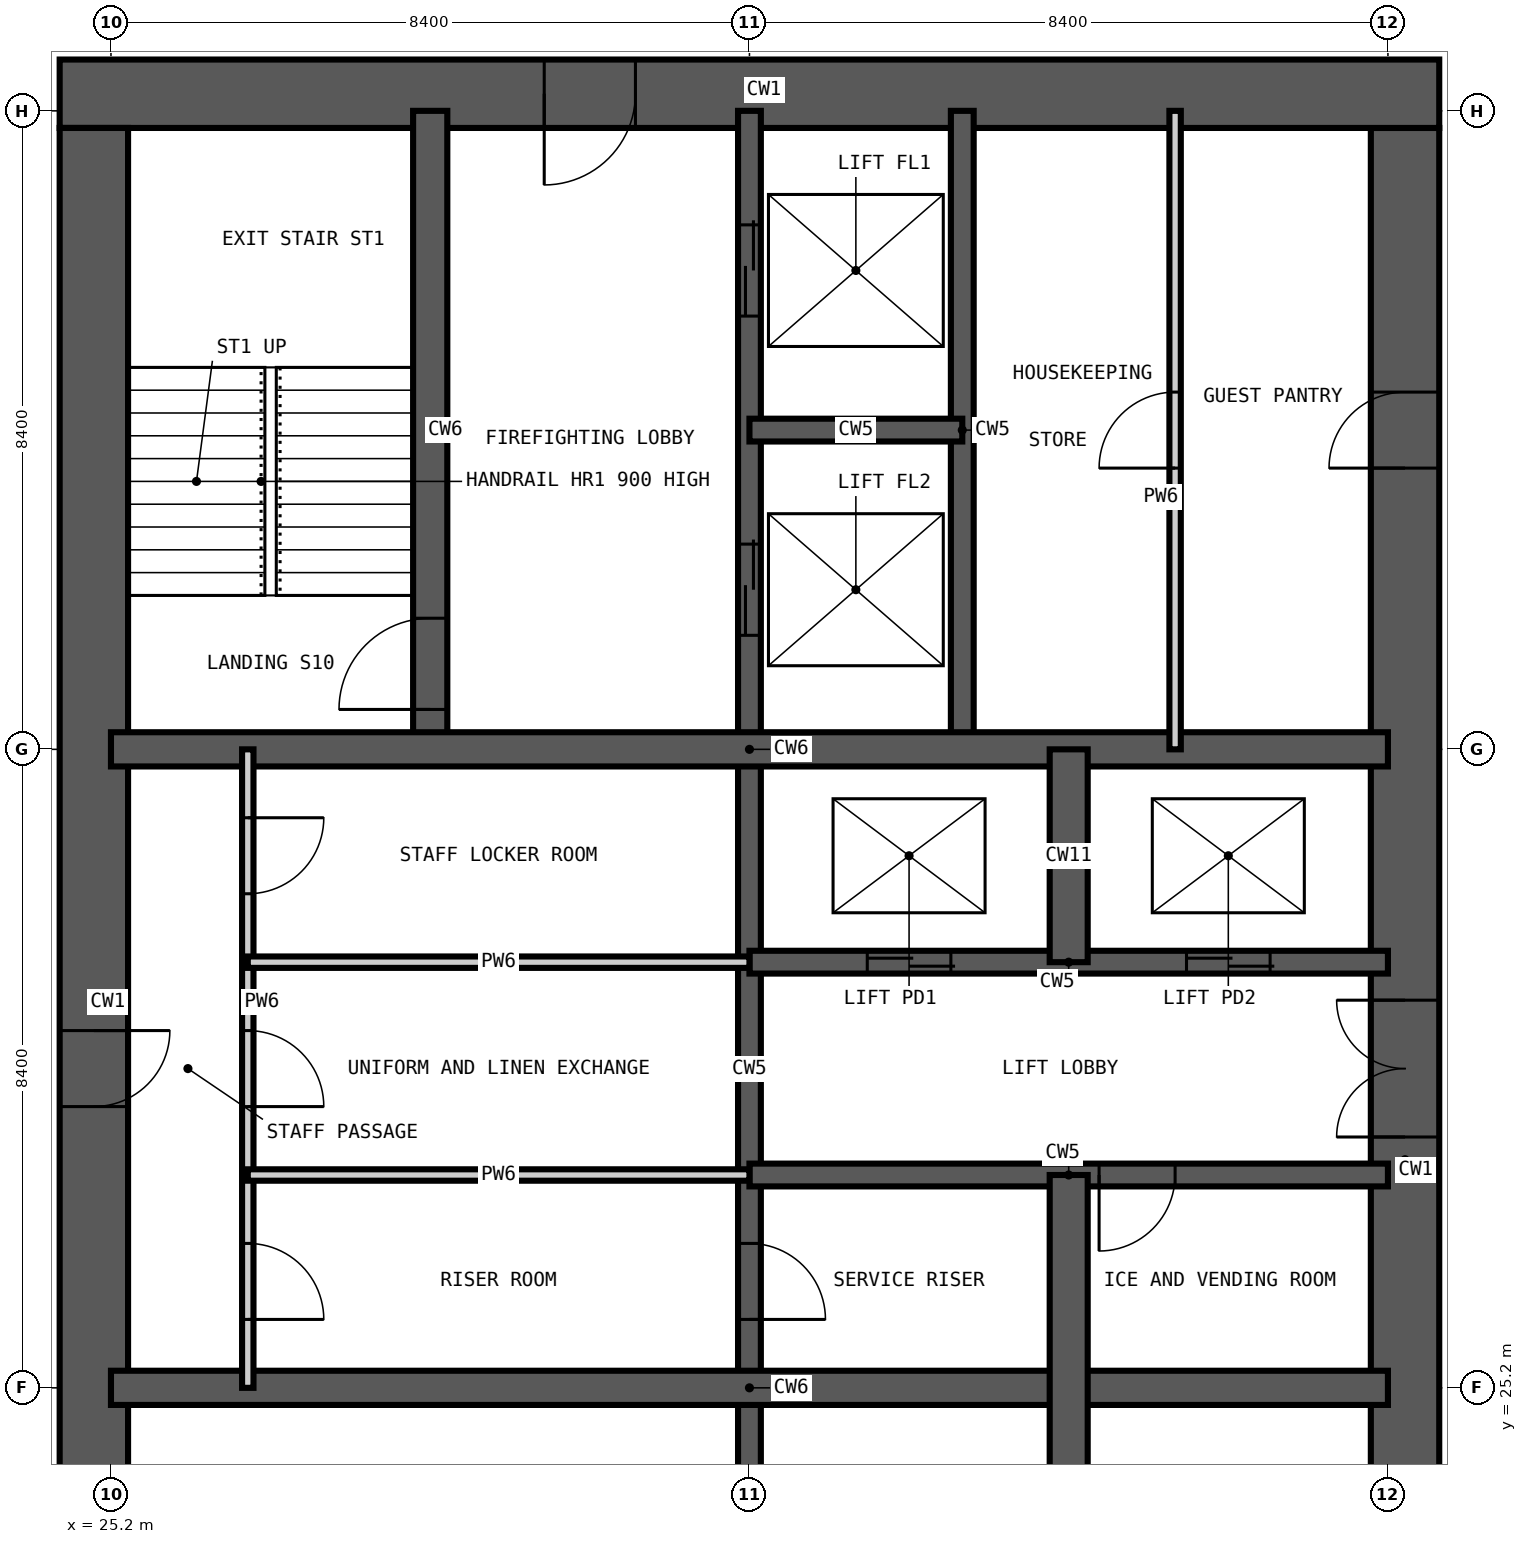
"""IFC4 building model, lengths in metres.
Left out: names, types, materials, properties, quantities, classifications, styles, units other than length and angle.
Written with IfcOpenShell. Run it as: python <this file> out.ifc"""

import sys

from ifc_helpers import new_model, si_unit, direction, frame, frame_2d, origin, place, context, subcontext, project, spatial, rectangle, extrude, element, fill, save


model = new_model("IFC4")
c1 = context("Model", 3, precision=1e-05, world=origin(), true_north=direction((0.0, 1.0)))
c2 = subcontext(c1, "Body", "Model", "MODEL_VIEW")
j1 = project(units=[si_unit("LENGTHUNIT", "METRE"), si_unit("PLANEANGLEUNIT", "RADIAN")], contexts=[c1])
p1 = place(None, origin())
s1 = spatial("IfcSite", under=j1, at=p1, CompositionType="ELEMENT")
p2 = place(p1, origin())
s2 = spatial("IfcBuilding", under=s1, at=p2, CompositionType="ELEMENT")
p3 = place(p2, frame((0.0, 0.0, 237.3)))
s3 = spatial("IfcBuildingStorey", under=s2, at=p3, CompositionType="ELEMENT", Elevation=237.3)
p4 = place(p3, frame((42.225, 17.025, -0.35), z_axis=(0.0, 0.0, 1.0), x_axis=(0.0, 1.0, 0.0)))
e1 = element("IfcWall", 1, at=p4, inside=s3, PredefinedType="SHEAR", context=c2, shape_type="SweptSolid", body=[
    extrude(rectangle(XDim=24.75, YDim=0.9, at=frame_2d((12.375, 0.0))), origin(), (0.0, 0.0, 1.0), 3.9),
])
p5 = place(p4, frame((0.575, 0.0, 0.35)))
e2 = element("IfcOpeningElement", 2, at=p5, cuts=e1, PredefinedType="OPENING", context=c2, shape_type="SweptSolid", body=[
    extrude(rectangle(XDim=1.2, YDim=2.2, at=frame_2d((0.6, 1.1))), frame((0.0, 0.46, 0.0), z_axis=(0.0, -1.0, 0.0), x_axis=(1.0, 0.0, 0.0)), (0.0, 0.0, 1.0), 0.92),
])
p6 = place(p4, frame((11.475, 0.0, 0.35)))
e3 = element("IfcOpeningElement", 3, at=p6, cuts=e1, PredefinedType="OPENING", context=c2, shape_type="SweptSolid", body=[
    extrude(rectangle(XDim=1.8, YDim=2.2, at=frame_2d((0.9, 1.1))), frame((0.0, 0.46, 0.0), z_axis=(0.0, -1.0, 0.0), x_axis=(1.0, 0.0, 0.0)), (0.0, 0.0, 1.0), 0.92),
])
p7 = place(p4, frame((20.275, 0.0, 0.35)))
e4 = element("IfcOpeningElement", 4, at=p7, cuts=e1, PredefinedType="OPENING", context=c2, shape_type="SweptSolid", body=[
    extrude(rectangle(XDim=1.0, YDim=2.1, at=frame_2d((0.5, 1.05))), frame((0.0, 0.46, 0.0), z_axis=(0.0, -1.0, 0.0), x_axis=(1.0, 0.0, 0.0)), (0.0, 0.0, 1.0), 0.92),
])
p8 = place(p3, frame((42.675, 42.225, -0.35), z_axis=(0.0, 0.0, 1.0), x_axis=(-1.0, 0.0, 0.0)))
e5 = element("IfcWall", 5, at=p8, inside=s3, PredefinedType="SHEAR", context=c2, shape_type="SweptSolid", body=[
    extrude(rectangle(XDim=18.15, YDim=0.9, at=frame_2d((9.075, 0.0))), origin(), (0.0, 0.0, 1.0), 3.9),
])
p9 = place(p8, frame((10.575, 0.0, 0.35)))
e6 = element("IfcOpeningElement", 6, at=p9, cuts=e5, PredefinedType="OPENING", context=c2, shape_type="SweptSolid", body=[
    extrude(rectangle(XDim=1.2, YDim=2.2, at=frame_2d((0.6, 1.1))), frame((0.0, 0.46, 0.0), z_axis=(0.0, -1.0, 0.0), x_axis=(1.0, 0.0, 0.0)), (0.0, 0.0, 1.0), 0.92),
])
p10 = place(p3, frame((24.975, 41.775, -0.35), z_axis=(0.0, 0.0, 1.0), x_axis=(0.0, -1.0, 0.0)))
e7 = element("IfcWall", 7, at=p10, inside=s3, PredefinedType="SHEAR", context=c2, shape_type="SweptSolid", body=[
    extrude(rectangle(XDim=24.75, YDim=0.9, at=frame_2d((12.375, 0.0))), origin(), (0.0, 0.0, 1.0), 3.9),
])
p11 = place(p10, frame((11.875, 0.0, 0.35)))
e8 = element("IfcOpeningElement", 8, at=p11, cuts=e7, PredefinedType="OPENING", context=c2, shape_type="SweptSolid", body=[
    extrude(rectangle(XDim=1.0, YDim=2.1, at=frame_2d((0.5, 1.05))), frame((0.0, 0.46, 0.0), z_axis=(0.0, -1.0, 0.0), x_axis=(1.0, 0.0, 0.0)), (0.0, 0.0, 1.0), 0.92),
])
p12 = place(p3, frame((33.6, 16.8, -0.35), z_axis=(0.0, 0.0, 1.0), x_axis=(0.0, 1.0, 0.0)))
e9 = element("IfcWall", 9, at=p12, inside=s3, PredefinedType="SHEAR", context=c2, shape_type="SweptSolid", body=[
    extrude(rectangle(XDim=25.2, YDim=0.3, at=frame_2d((12.6, 0.0))), origin(), (0.0, 0.0, 1.0), 3.9),
])
p13 = place(p12, frame((22.5, 0.0, 0.35)))
e10 = element("IfcOpeningElement", 10, at=p13, cuts=e9, PredefinedType="OPENING", context=c2, shape_type="SweptSolid", body=[
    extrude(rectangle(XDim=1.2, YDim=2.2, at=frame_2d((0.6, 1.1))), frame((0.0, 0.16, 0.0), z_axis=(0.0, -1.0, 0.0), x_axis=(1.0, 0.0, 0.0)), (0.0, 0.0, 1.0), 0.32),
])
p14 = place(p12, frame((18.3, 0.0, 0.35)))
e11 = element("IfcOpeningElement", 11, at=p14, cuts=e9, PredefinedType="OPENING", context=c2, shape_type="SweptSolid", body=[
    extrude(rectangle(XDim=1.2, YDim=2.2, at=frame_2d((0.6, 1.1))), frame((0.0, 0.16, 0.0), z_axis=(0.0, -1.0, 0.0), x_axis=(1.0, 0.0, 0.0)), (0.0, 0.0, 1.0), 0.32),
])
p15 = place(p12, frame((9.3, 0.0, 0.35)))
e12 = element("IfcOpeningElement", 12, at=p15, cuts=e9, PredefinedType="OPENING", context=c2, shape_type="SweptSolid", body=[
    extrude(rectangle(XDim=1.0, YDim=2.1, at=frame_2d((0.5, 1.05))), frame((0.0, 0.16, 0.0), z_axis=(0.0, -1.0, 0.0), x_axis=(1.0, 0.0, 0.0)), (0.0, 0.0, 1.0), 0.32),
])
p16 = place(p3, frame((36.4, 33.6, -0.35), z_axis=(0.0, 0.0, 1.0), x_axis=(0.0, 1.0, 0.0)))
e13 = element("IfcWall", 13, at=p16, inside=s3, PredefinedType="SHEAR", context=c2, shape_type="SweptSolid", body=[
    extrude(rectangle(XDim=8.4, YDim=0.3, at=frame_2d((4.2, 0.0))), origin(), (0.0, 0.0, 1.0), 3.9),
])
p17 = place(p3, frame((33.6, 28.0, -0.35), z_axis=(0.0, 0.0, 1.0), x_axis=(1.0, 0.0, 0.0)))
e14 = element("IfcWall", 14, at=p17, inside=s3, PredefinedType="SHEAR", context=c2, shape_type="SweptSolid", body=[
    extrude(rectangle(XDim=8.4, YDim=0.3, at=frame_2d((4.2, 0.0))), origin(), (0.0, 0.0, 1.0), 3.9),
])
p18 = place(p17, frame((4.6, 0.0, 0.35)))
e15 = element("IfcOpeningElement", 15, at=p18, cuts=e14, PredefinedType="OPENING", context=c2, shape_type="SweptSolid", body=[
    extrude(rectangle(XDim=1.0, YDim=2.1, at=frame_2d((0.5, 1.05))), frame((0.0, 0.16, 0.0), z_axis=(0.0, -1.0, 0.0), x_axis=(1.0, 0.0, 0.0)), (0.0, 0.0, 1.0), 0.32),
])
p19 = place(p3, frame((33.6, 30.8, -0.35), z_axis=(0.0, 0.0, 1.0), x_axis=(1.0, 0.0, 0.0)))
e16 = element("IfcWall", 16, at=p19, inside=s3, PredefinedType="SHEAR", context=c2, shape_type="SweptSolid", body=[
    extrude(rectangle(XDim=8.4, YDim=0.3, at=frame_2d((4.2, 0.0))), origin(), (0.0, 0.0, 1.0), 3.9),
])
p20 = place(p19, frame((1.55, 0.0, 0.35)))
e17 = element("IfcOpeningElement", 17, at=p20, cuts=e16, PredefinedType="OPENING", context=c2, shape_type="SweptSolid", body=[
    extrude(rectangle(XDim=1.1, YDim=2.2, at=frame_2d((0.55, 1.1))), frame((0.0, 0.16, 0.0), z_axis=(0.0, -1.0, 0.0), x_axis=(1.0, 0.0, 0.0)), (0.0, 0.0, 1.0), 0.32),
])
p21 = place(p19, frame((5.75, 0.0, 0.35)))
e18 = element("IfcOpeningElement", 18, at=p21, cuts=e16, PredefinedType="OPENING", context=c2, shape_type="SweptSolid", body=[
    extrude(rectangle(XDim=1.1, YDim=2.2, at=frame_2d((0.55, 1.1))), frame((0.0, 0.16, 0.0), z_axis=(0.0, -1.0, 0.0), x_axis=(1.0, 0.0, 0.0)), (0.0, 0.0, 1.0), 0.32),
])
p22 = place(p3, frame((33.6, 37.8, -0.35), z_axis=(0.0, 0.0, 1.0), x_axis=(1.0, 0.0, 0.0)))
e19 = element("IfcWall", 19, at=p22, inside=s3, PredefinedType="SHEAR", context=c2, shape_type="SweptSolid", body=[
    extrude(rectangle(XDim=2.8, YDim=0.3, at=frame_2d((1.4, 0.0))), origin(), (0.0, 0.0, 1.0), 3.9),
])
p23 = place(p3, frame((29.4, 33.6, -0.35), z_axis=(0.0, 0.0, 1.0), x_axis=(0.0, 1.0, 0.0)))
e20 = element("IfcWall", 20, at=p23, inside=s3, PredefinedType="SHEAR", context=c2, shape_type="SweptSolid", body=[
    extrude(rectangle(XDim=8.4, YDim=0.45, at=frame_2d((4.2, 0.0))), origin(), (0.0, 0.0, 1.0), 3.9),
])
p24 = place(p23, frame((0.525, 0.0, 0.35)))
e21 = element("IfcOpeningElement", 21, at=p24, cuts=e20, PredefinedType="OPENING", context=c2, shape_type="SweptSolid", body=[
    extrude(rectangle(XDim=1.2, YDim=2.2, at=frame_2d((0.6, 1.1))), frame((0.0, 0.235, 0.0), z_axis=(0.0, -1.0, 0.0), x_axis=(1.0, 0.0, 0.0)), (0.0, 0.0, 1.0), 0.47),
])
for number, where, z_axis, x_axis in (
    (22, (25.2, 25.2, -0.35), (0.0, 0.0, 1.0), (1.0, 0.0, 0.0)),
    (23, (25.2, 33.6, -0.35), (0.0, 0.0, 1.0), (1.0, 0.0, 0.0)),
):
    element("IfcWall", number, at=place(p3, frame(where, z_axis=z_axis, x_axis=x_axis)), inside=s3, PredefinedType="SHEAR", context=c2, shape_type="SweptSolid", body=[
        extrude(rectangle(XDim=16.8, YDim=0.45, at=frame_2d((8.4, 0.0))), origin(), (0.0, 0.0, 1.0), 3.9),
    ])
p25 = place(p3, frame((37.8, 16.8, -0.35), z_axis=(0.0, 0.0, 1.0), x_axis=(0.0, 1.0, 0.0)))
e24 = element("IfcWall", 24, at=p25, inside=s3, PredefinedType="SHEAR", context=c2, shape_type="SweptSolid", body=[
    extrude(rectangle(XDim=11.2, YDim=0.5, at=frame_2d((5.6, 0.0))), origin(), (0.0, 0.0, 1.0), 3.9),
])
p26 = place(p3, frame((37.8, 30.8, -0.35), z_axis=(0.0, 0.0, 1.0), x_axis=(0.0, 1.0, 0.0)))
e25 = element("IfcWall", 25, at=p26, inside=s3, PredefinedType="SHEAR", context=c2, shape_type="SweptSolid", body=[
    extrude(rectangle(XDim=2.8, YDim=0.5, at=frame_2d((1.4, 0.0))), origin(), (0.0, 0.0, 1.0), 3.9),
])
p27 = place(p3, frame((27.0, 25.2, 0.0), z_axis=(0.0, 0.0, 1.0), x_axis=(0.0, 1.0, 0.0)))
e26 = element("IfcWall", 26, at=p27, inside=s3, PredefinedType="PARTITIONING", context=c2, shape_type="SweptSolid", body=[
    extrude(rectangle(XDim=8.4, YDim=0.15, at=frame_2d((4.2, 0.0))), origin(), (0.0, 0.0, 1.0), 3.55),
])
p28 = place(p27, frame((0.9, 0.0, 0.0)))
e27 = element("IfcOpeningElement", 27, at=p28, cuts=e26, PredefinedType="OPENING", context=c2, shape_type="SweptSolid", body=[
    extrude(rectangle(XDim=1.0, YDim=2.1, at=frame_2d((0.5, 1.05))), frame((0.0, 0.085, 0.0), z_axis=(0.0, -1.0, 0.0), x_axis=(1.0, 0.0, 0.0)), (0.0, 0.0, 1.0), 0.17),
])
p29 = place(p27, frame((3.7, 0.0, 0.0)))
e28 = element("IfcOpeningElement", 28, at=p29, cuts=e26, PredefinedType="OPENING", context=c2, shape_type="SweptSolid", body=[
    extrude(rectangle(XDim=1.0, YDim=2.1, at=frame_2d((0.5, 1.05))), frame((0.0, 0.085, 0.0), z_axis=(0.0, -1.0, 0.0), x_axis=(1.0, 0.0, 0.0)), (0.0, 0.0, 1.0), 0.17),
])
p30 = place(p27, frame((6.5, 0.0, 0.0)))
e29 = element("IfcOpeningElement", 29, at=p30, cuts=e26, PredefinedType="OPENING", context=c2, shape_type="SweptSolid", body=[
    extrude(rectangle(XDim=1.0, YDim=2.1, at=frame_2d((0.5, 1.05))), frame((0.0, 0.085, 0.0), z_axis=(0.0, -1.0, 0.0), x_axis=(1.0, 0.0, 0.0)), (0.0, 0.0, 1.0), 0.17),
])
p31 = place(p3, frame((39.2, 33.6, 0.0), z_axis=(0.0, 0.0, 1.0), x_axis=(0.0, 1.0, 0.0)))
e30 = element("IfcWall", 30, at=p31, inside=s3, PredefinedType="PARTITIONING", context=c2, shape_type="SweptSolid", body=[
    extrude(rectangle(XDim=8.4, YDim=0.15, at=frame_2d((4.2, 0.0))), origin(), (0.0, 0.0, 1.0), 3.55),
])
p32 = place(p31, frame((3.7, 0.0, 0.0)))
e31 = element("IfcOpeningElement", 31, at=p32, cuts=e30, PredefinedType="OPENING", context=c2, shape_type="SweptSolid", body=[
    extrude(rectangle(XDim=1.0, YDim=2.1, at=frame_2d((0.5, 1.05))), frame((0.0, 0.085, 0.0), z_axis=(0.0, -1.0, 0.0), x_axis=(1.0, 0.0, 0.0)), (0.0, 0.0, 1.0), 0.17),
])
for number, where, z_axis, x_axis in (
    (32, (27.0, 28.0, 0.0), (0.0, 0.0, 1.0), (1.0, 0.0, 0.0)),
    (33, (27.0, 30.8, 0.0), (0.0, 0.0, 1.0), (1.0, 0.0, 0.0)),
):
    element("IfcWall", number, at=place(p3, frame(where, z_axis=z_axis, x_axis=x_axis)), inside=s3, PredefinedType="PARTITIONING", context=c2, shape_type="SweptSolid", body=[
        extrude(rectangle(XDim=6.6, YDim=0.15, at=frame_2d((3.3, 0.0))), origin(), (0.0, 0.0, 1.0), 3.55),
    ])
p33 = place(p24, origin())
e34 = element("IfcDoor", 34, at=p33, inside=s3, OperationType="SINGLE_SWING_LEFT", PredefinedType="DOOR", context=c2, shape_type="SweptSolid", body=[
    extrude(rectangle(XDim=1.2, YDim=2.2, at=frame_2d((0.6, 1.1))), frame((0.0, 0.025, 0.0), z_axis=(0.0, -1.0, 0.0), x_axis=(1.0, 0.0, 0.0)), (0.0, 0.0, 1.0), 0.05),
])
fill(e21, e34)
p34 = place(p20, origin())
e35 = element("IfcDoor", 35, at=p34, inside=s3, OperationType="DOUBLE_DOOR_SLIDING", PredefinedType="DOOR", context=c2, shape_type="SweptSolid", body=[
    extrude(rectangle(XDim=1.1, YDim=2.2, at=frame_2d((0.55, 1.1))), frame((0.0, 0.025, 0.0), z_axis=(0.0, -1.0, 0.0), x_axis=(1.0, 0.0, 0.0)), (0.0, 0.0, 1.0), 0.05),
])
fill(e17, e35)
p35 = place(p21, origin())
e36 = element("IfcDoor", 36, at=p35, inside=s3, OperationType="DOUBLE_DOOR_SLIDING", PredefinedType="DOOR", context=c2, shape_type="SweptSolid", body=[
    extrude(rectangle(XDim=1.1, YDim=2.2, at=frame_2d((0.55, 1.1))), frame((0.0, 0.025, 0.0), z_axis=(0.0, -1.0, 0.0), x_axis=(1.0, 0.0, 0.0)), (0.0, 0.0, 1.0), 0.05),
])
fill(e18, e36)
p36 = place(p13, origin())
e37 = element("IfcDoor", 37, at=p36, inside=s3, OperationType="DOUBLE_DOOR_SLIDING", PredefinedType="DOOR", context=c2, shape_type="SweptSolid", body=[
    extrude(rectangle(XDim=1.2, YDim=2.2, at=frame_2d((0.6, 1.1))), frame((0.0, 0.025, 0.0), z_axis=(0.0, -1.0, 0.0), x_axis=(1.0, 0.0, 0.0)), (0.0, 0.0, 1.0), 0.05),
])
fill(e10, e37)
p37 = place(p14, origin())
e38 = element("IfcDoor", 38, at=p37, inside=s3, OperationType="DOUBLE_DOOR_SLIDING", PredefinedType="DOOR", context=c2, shape_type="SweptSolid", body=[
    extrude(rectangle(XDim=1.2, YDim=2.2, at=frame_2d((0.6, 1.1))), frame((0.0, 0.025, 0.0), z_axis=(0.0, -1.0, 0.0), x_axis=(1.0, 0.0, 0.0)), (0.0, 0.0, 1.0), 0.05),
])
fill(e11, e38)
p38 = place(p11, origin())
e39 = element("IfcDoor", 39, at=p38, inside=s3, OperationType="SINGLE_SWING_LEFT", PredefinedType="DOOR", context=c2, shape_type="SweptSolid", body=[
    extrude(rectangle(XDim=1.0, YDim=2.1, at=frame_2d((0.5, 1.05))), frame((0.0, 0.025, 0.0), z_axis=(0.0, -1.0, 0.0), x_axis=(1.0, 0.0, 0.0)), (0.0, 0.0, 1.0), 0.05),
])
fill(e8, e39)
p39 = place(p28, frame((1.0, 0.0, 0.0), z_axis=(0.0, 0.0, 1.0), x_axis=(-1.0, 0.0, 0.0)))
e40 = element("IfcDoor", 40, at=p39, inside=s3, OperationType="SINGLE_SWING_RIGHT", PredefinedType="DOOR", context=c2, shape_type="SweptSolid", body=[
    extrude(rectangle(XDim=1.0, YDim=2.1, at=frame_2d((0.5, 1.05))), frame((0.0, 0.025, 0.0), z_axis=(0.0, -1.0, 0.0), x_axis=(1.0, 0.0, 0.0)), (0.0, 0.0, 1.0), 0.05),
])
fill(e27, e40)
p40 = place(p29, frame((1.0, 0.0, 0.0), z_axis=(0.0, 0.0, 1.0), x_axis=(-1.0, 0.0, 0.0)))
e41 = element("IfcDoor", 41, at=p40, inside=s3, OperationType="SINGLE_SWING_RIGHT", PredefinedType="DOOR", context=c2, shape_type="SweptSolid", body=[
    extrude(rectangle(XDim=1.0, YDim=2.1, at=frame_2d((0.5, 1.05))), frame((0.0, 0.025, 0.0), z_axis=(0.0, -1.0, 0.0), x_axis=(1.0, 0.0, 0.0)), (0.0, 0.0, 1.0), 0.05),
])
fill(e28, e41)
p41 = place(p30, frame((1.0, 0.0, 0.0), z_axis=(0.0, 0.0, 1.0), x_axis=(-1.0, 0.0, 0.0)))
e42 = element("IfcDoor", 42, at=p41, inside=s3, OperationType="SINGLE_SWING_LEFT", PredefinedType="DOOR", context=c2, shape_type="SweptSolid", body=[
    extrude(rectangle(XDim=1.0, YDim=2.1, at=frame_2d((0.5, 1.05))), frame((0.0, 0.025, 0.0), z_axis=(0.0, -1.0, 0.0), x_axis=(1.0, 0.0, 0.0)), (0.0, 0.0, 1.0), 0.05),
])
fill(e29, e42)
p42 = place(p15, frame((1.0, 0.0, 0.0), z_axis=(0.0, 0.0, 1.0), x_axis=(-1.0, 0.0, 0.0)))
e43 = element("IfcDoor", 43, at=p42, inside=s3, OperationType="SINGLE_SWING_RIGHT", PredefinedType="DOOR", context=c2, shape_type="SweptSolid", body=[
    extrude(rectangle(XDim=1.0, YDim=2.1, at=frame_2d((0.5, 1.05))), frame((0.0, 0.025, 0.0), z_axis=(0.0, -1.0, 0.0), x_axis=(1.0, 0.0, 0.0)), (0.0, 0.0, 1.0), 0.05),
])
fill(e12, e43)
p43 = place(p18, frame((1.0, 0.0, 0.0), z_axis=(0.0, 0.0, 1.0), x_axis=(-1.0, 0.0, 0.0)))
e44 = element("IfcDoor", 44, at=p43, inside=s3, OperationType="SINGLE_SWING_RIGHT", PredefinedType="DOOR", context=c2, shape_type="SweptSolid", body=[
    extrude(rectangle(XDim=1.0, YDim=2.1, at=frame_2d((0.5, 1.05))), frame((0.0, 0.025, 0.0), z_axis=(0.0, -1.0, 0.0), x_axis=(1.0, 0.0, 0.0)), (0.0, 0.0, 1.0), 0.05),
])
fill(e15, e44)
p44 = place(p6, origin())
e45 = element("IfcDoor", 45, at=p44, inside=s3, OperationType="DOUBLE_DOOR_DOUBLE_SWING", PredefinedType="DOOR", context=c2, shape_type="SweptSolid", body=[
    extrude(rectangle(XDim=1.8, YDim=2.2, at=frame_2d((0.9, 1.1))), frame((0.0, 0.025, 0.0), z_axis=(0.0, -1.0, 0.0), x_axis=(1.0, 0.0, 0.0)), (0.0, 0.0, 1.0), 0.05),
])
fill(e3, e45)
p45 = place(p9, origin())
e46 = element("IfcDoor", 46, at=p45, inside=s3, OperationType="SINGLE_SWING_RIGHT", PredefinedType="DOOR", context=c2, shape_type="SweptSolid", body=[
    extrude(rectangle(XDim=1.2, YDim=2.2, at=frame_2d((0.6, 1.1))), frame((0.0, 0.025, 0.0), z_axis=(0.0, -1.0, 0.0), x_axis=(1.0, 0.0, 0.0)), (0.0, 0.0, 1.0), 0.05),
])
fill(e6, e46)
p46 = place(p7, origin())
e47 = element("IfcDoor", 47, at=p46, inside=s3, OperationType="SINGLE_SWING_LEFT", PredefinedType="DOOR", context=c2, shape_type="SweptSolid", body=[
    extrude(rectangle(XDim=1.0, YDim=2.1, at=frame_2d((0.5, 1.05))), frame((0.0, 0.025, 0.0), z_axis=(0.0, -1.0, 0.0), x_axis=(1.0, 0.0, 0.0)), (0.0, 0.0, 1.0), 0.05),
])
fill(e4, e47)
p47 = place(p32, origin())
e48 = element("IfcDoor", 48, at=p47, inside=s3, OperationType="SINGLE_SWING_LEFT", PredefinedType="DOOR", context=c2, shape_type="SweptSolid", body=[
    extrude(rectangle(XDim=1.0, YDim=2.1, at=frame_2d((0.5, 1.05))), frame((0.0, 0.025, 0.0), z_axis=(0.0, -1.0, 0.0), x_axis=(1.0, 0.0, 0.0)), (0.0, 0.0, 1.0), 0.05),
])
fill(e31, e48)
save(model, sys.argv[1])
